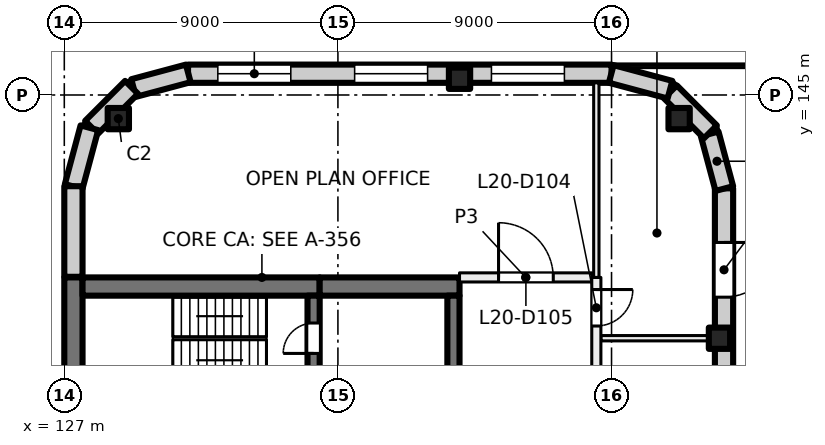
"""IFC4 building model, lengths in metres.
Left out: names, types, materials, properties, quantities, classifications, styles, units other than length and angle.
Written with IfcOpenShell. Run it as: python <this file> out.ifc"""

import sys

from ifc_helpers import new_model, si_unit, direction, frame, frame_2d, origin, origin_2d, place, context, subcontext, project, spatial, rectangle, extrude, element, fill, save


model = new_model("IFC4")
c1 = context("Model", 3, precision=1e-05, world=origin(), true_north=direction((0.0, 1.0)))
c2 = subcontext(c1, "Body", "Model", "MODEL_VIEW")
j1 = project(units=[si_unit("LENGTHUNIT", "METRE"), si_unit("PLANEANGLEUNIT", "RADIAN")], contexts=[c1])
p1 = place(None, origin())
s1 = spatial("IfcSite", under=j1, at=p1, CompositionType="ELEMENT")
p2 = place(p1, origin())
s2 = spatial("IfcBuilding", under=s1, at=p2, CompositionType="ELEMENT")
p3 = place(p2, frame((0.0, 0.0, 89.0)))
s3 = spatial("IfcBuildingStorey", under=s2, at=p3, CompositionType="ELEMENT", Elevation=89.0)
for number, where, z_axis, x_axis in (
    (1, (128.777, 144.223, 0.0), (0.0, 0.0, 1.0), (1.0, 0.0, 0.0)),
    (2, (148.55, 137.0, 0.0), (0.0, 0.0, 1.0), (1.0, 0.0, 0.0)),
    (3, (140.0, 145.55, 0.0), (0.0, 0.0, 1.0), (1.0, 0.0, 0.0)),
    (4, (147.223, 144.223, 0.0), (0.0, 0.0, 1.0), (1.0, 0.0, 0.0)),
):
    element("IfcColumn", number, at=place(p3, frame(where, z_axis=z_axis, x_axis=x_axis)), inside=s3, PredefinedType="COLUMN", context=c2, shape_type="SweptSolid", body=[
        extrude(rectangle(XDim=0.7, YDim=0.7, at=origin_2d()), origin(), (0.0, 0.0, 1.0), 4.0),
    ])
p4 = place(p3, frame((127.3, 135.2, 0.0), z_axis=(0.0, 0.0, 1.0), x_axis=(0.0, 1.0, 0.0)))
e5 = element("IfcWall", 5, at=p4, inside=s3, PredefinedType="SHEAR", context=c2, shape_type="SweptSolid", body=[
    extrude(rectangle(XDim=3.8, YDim=0.6, at=frame_2d((1.9, 0.0))), origin(), (0.0, 0.0, 1.0), 4.0),
])
p5 = place(p3, frame((127.6, 138.7, 0.0), z_axis=(0.0, 0.0, 1.0), x_axis=(1.0, 0.0, 0.0)))
e6 = element("IfcWall", 6, at=p5, inside=s3, PredefinedType="SHEAR", context=c2, shape_type="SweptSolid", body=[
    extrude(rectangle(XDim=7.8, YDim=0.6, at=frame_2d((3.9, 0.0))), origin(), (0.0, 0.0, 1.0), 4.0),
])
p6 = place(p3, frame((135.4, 138.7, 0.0), z_axis=(0.0, 0.0, 1.0), x_axis=(1.0, 0.0, 0.0)))
e7 = element("IfcWall", 7, at=p6, inside=s3, PredefinedType="SHEAR", context=c2, shape_type="SweptSolid", body=[
    extrude(rectangle(XDim=4.6, YDim=0.6, at=frame_2d((2.3, 0.0))), origin(), (0.0, 0.0, 1.0), 4.0),
])
p7 = place(p3, frame((135.2, 135.6, 0.0), z_axis=(0.0, 0.0, 1.0), x_axis=(0.0, 1.0, 0.0)))
e8 = element("IfcWall", 8, at=p7, inside=s3, PredefinedType="SHEAR", context=c2, shape_type="SweptSolid", body=[
    extrude(rectangle(XDim=2.8, YDim=0.4, at=frame_2d((1.4, 0.0))), origin(), (0.0, 0.0, 1.0), 4.0),
])
p8 = place(p7, frame((0.9, 0.0, 0.0)))
e9 = element("IfcOpeningElement", 9, at=p8, cuts=e8, PredefinedType="OPENING", context=c2, shape_type="SweptSolid", body=[
    extrude(rectangle(XDim=1.0, YDim=2.1, at=frame_2d((0.5, 1.05))), frame((0.0, 0.21, 0.0), z_axis=(0.0, -1.0, 0.0), x_axis=(1.0, 0.0, 0.0)), (0.0, 0.0, 1.0), 0.42),
])
p9 = place(p3, frame((139.8, 129.8, 0.0), z_axis=(0.0, 0.0, 1.0), x_axis=(0.0, 1.0, 0.0)))
e10 = element("IfcWall", 10, at=p9, inside=s3, PredefinedType="SHEAR", context=c2, shape_type="SweptSolid", body=[
    extrude(rectangle(XDim=8.6, YDim=0.4, at=frame_2d((4.3, 0.0))), origin(), (0.0, 0.0, 1.0), 4.0),
])
p10 = place(p3, frame((131.07, 145.7, 0.0), z_axis=(0.0, 0.0, 1.0), x_axis=(1.0, 0.0, 0.0)))
e11 = element("IfcWall", 11, at=p10, inside=s3, PredefinedType="SOLIDWALL", context=c2, shape_type="SweptSolid", body=[
    extrude(rectangle(XDim=13.93, YDim=0.6, at=frame_2d((6.965, 0.0))), origin(), (0.0, 0.0, 1.0), 3.625),
])
p11 = place(p10, frame((0.98, 0.0, 0.9)))
e12 = element("IfcOpeningElement", 12, at=p11, cuts=e11, PredefinedType="OPENING", context=c2, shape_type="SweptSolid", body=[
    extrude(rectangle(XDim=2.4, YDim=2.4, at=frame_2d((1.2, 1.2))), frame((0.0, 0.31, 0.0), z_axis=(0.0, -1.0, 0.0), x_axis=(1.0, 0.0, 0.0)), (0.0, 0.0, 1.0), 0.62),
])
p12 = place(p10, frame((5.48, 0.0, 0.9)))
e13 = element("IfcOpeningElement", 13, at=p12, cuts=e11, PredefinedType="OPENING", context=c2, shape_type="SweptSolid", body=[
    extrude(rectangle(XDim=2.4, YDim=2.4, at=frame_2d((1.2, 1.2))), frame((0.0, 0.31, 0.0), z_axis=(0.0, -1.0, 0.0), x_axis=(1.0, 0.0, 0.0)), (0.0, 0.0, 1.0), 0.62),
])
p13 = place(p10, frame((9.98, 0.0, 0.9)))
e14 = element("IfcOpeningElement", 14, at=p13, cuts=e11, PredefinedType="OPENING", context=c2, shape_type="SweptSolid", body=[
    extrude(rectangle(XDim=2.4, YDim=2.4, at=frame_2d((1.2, 1.2))), frame((0.0, 0.31, 0.0), z_axis=(0.0, -1.0, 0.0), x_axis=(1.0, 0.0, 0.0)), (0.0, 0.0, 1.0), 0.62),
])
for number, where, z_axis, x_axis in (
    (15, (129.281, 145.229, 0.0), (0.0, 0.0, 1.0), (0.966, 0.259, 0.0)),
    (16, (127.896, 143.936, 0.0), (0.0, 0.0, 1.0), (0.707, 0.707, 0.0)),
):
    element("IfcWall", number, at=place(p3, frame(where, z_axis=z_axis, x_axis=x_axis)), inside=s3, PredefinedType="SOLIDWALL", context=c2, shape_type="SweptSolid", body=[
        extrude(rectangle(XDim=1.861, YDim=0.6, at=frame_2d((0.93, 0.0))), origin(), (0.0, 0.0, 1.0), 3.625),
    ])
p14 = place(p3, frame((127.308, 141.99, 0.0), z_axis=(0.0, 0.0, 1.0), x_axis=(0.258839784042, 0.965920269068, 0.0)))
e17 = element("IfcWall", 17, at=p14, inside=s3, PredefinedType="SOLIDWALL", context=c2, shape_type="SweptSolid", body=[
    extrude(rectangle(XDim=2.0, YDim=0.6, at=frame_2d((1.0, 0.0))), origin(), (0.0, 0.0, 1.0), 3.625),
])
p15 = place(p3, frame((127.3, 139.02, 0.0), z_axis=(0.0, 0.0, 1.0), x_axis=(0.0, 1.0, 0.0)))
e18 = element("IfcWall", 18, at=p15, inside=s3, PredefinedType="SOLIDWALL", context=c2, shape_type="SweptSolid", body=[
    extrude(rectangle(XDim=2.98, YDim=0.6, at=frame_2d((1.49, 0.0))), origin(), (0.0, 0.0, 1.0), 3.625),
])
p16 = place(p3, frame((148.7, 141.93, 0.0), z_axis=(0.0, 0.0, 1.0), x_axis=(0.0, -1.0, 0.0)))
e19 = element("IfcWall", 19, at=p16, inside=s3, PredefinedType="SOLIDWALL", context=c2, shape_type="SweptSolid", body=[
    extrude(rectangle(XDim=27.93, YDim=0.6, at=frame_2d((13.965, 0.0))), origin(), (0.0, 0.0, 1.0), 3.625),
])
p17 = place(p16, frame((1.78, 0.0, 0.0)))
e20 = element("IfcOpeningElement", 20, at=p17, cuts=e19, PredefinedType="OPENING", context=c2, shape_type="SweptSolid", body=[
    extrude(rectangle(XDim=1.8, YDim=2.4, at=frame_2d((0.9, 1.2))), frame((0.0, 0.31, 0.0), z_axis=(0.0, -1.0, 0.0), x_axis=(1.0, 0.0, 0.0)), (0.0, 0.0, 1.0), 0.62),
])
p18 = place(p16, frame((5.98, 0.0, 0.9)))
e21 = element("IfcOpeningElement", 21, at=p18, cuts=e19, PredefinedType="OPENING", context=c2, shape_type="SweptSolid", body=[
    extrude(rectangle(XDim=2.4, YDim=2.4, at=frame_2d((1.2, 1.2))), frame((0.0, 0.31, 0.0), z_axis=(0.0, -1.0, 0.0), x_axis=(1.0, 0.0, 0.0)), (0.0, 0.0, 1.0), 0.62),
])
p19 = place(p16, frame((10.48, 0.0, 0.9)))
e22 = element("IfcOpeningElement", 22, at=p19, cuts=e19, PredefinedType="OPENING", context=c2, shape_type="SweptSolid", body=[
    extrude(rectangle(XDim=2.4, YDim=2.4, at=frame_2d((1.2, 1.2))), frame((0.0, 0.31, 0.0), z_axis=(0.0, -1.0, 0.0), x_axis=(1.0, 0.0, 0.0)), (0.0, 0.0, 1.0), 0.62),
])
p20 = place(p16, frame((14.98, 0.0, 0.9)))
e23 = element("IfcOpeningElement", 23, at=p20, cuts=e19, PredefinedType="OPENING", context=c2, shape_type="SweptSolid", body=[
    extrude(rectangle(XDim=2.4, YDim=2.4, at=frame_2d((1.2, 1.2))), frame((0.0, 0.31, 0.0), z_axis=(0.0, -1.0, 0.0), x_axis=(1.0, 0.0, 0.0)), (0.0, 0.0, 1.0), 0.62),
])
p21 = place(p16, frame((19.78, 0.0, 0.0)))
e24 = element("IfcOpeningElement", 24, at=p21, cuts=e19, PredefinedType="OPENING", context=c2, shape_type="SweptSolid", body=[
    extrude(rectangle(XDim=1.8, YDim=2.4, at=frame_2d((0.9, 1.2))), frame((0.0, 0.31, 0.0), z_axis=(0.0, -1.0, 0.0), x_axis=(1.0, 0.0, 0.0)), (0.0, 0.0, 1.0), 0.62),
])
p22 = place(p16, frame((23.98, 0.0, 0.9)))
e25 = element("IfcOpeningElement", 25, at=p22, cuts=e19, PredefinedType="OPENING", context=c2, shape_type="SweptSolid", body=[
    extrude(rectangle(XDim=2.4, YDim=2.4, at=frame_2d((1.2, 1.2))), frame((0.0, 0.31, 0.0), z_axis=(0.0, -1.0, 0.0), x_axis=(1.0, 0.0, 0.0)), (0.0, 0.0, 1.0), 0.62),
])
for number, where, z_axis, x_axis in (
    (26, (148.229, 143.719, 0.0), (0.0, 0.0, 1.0), (0.259, -0.966, 0.0)),
    (27, (146.936, 145.104, 0.0), (0.0, 0.0, 1.0), (0.707, -0.707, 0.0)),
):
    element("IfcWall", number, at=place(p3, frame(where, z_axis=z_axis, x_axis=x_axis)), inside=s3, PredefinedType="SOLIDWALL", context=c2, shape_type="SweptSolid", body=[
        extrude(rectangle(XDim=1.861, YDim=0.6, at=frame_2d((0.93, 0.0))), origin(), (0.0, 0.0, 1.0), 3.625),
    ])
p23 = place(p3, frame((144.99, 145.692, 0.0), z_axis=(0.0, 0.0, 1.0), x_axis=(0.965920269068, -0.258839784042, 0.0)))
e28 = element("IfcWall", 28, at=p23, inside=s3, PredefinedType="SOLIDWALL", context=c2, shape_type="SweptSolid", body=[
    extrude(rectangle(XDim=2.0, YDim=0.6, at=frame_2d((1.0, 0.0))), origin(), (0.0, 0.0, 1.0), 3.625),
])
p24 = place(p3, frame((140.0, 139.0, 0.0), z_axis=(0.0, 0.0, 1.0), x_axis=(1.0, 0.0, 0.0)))
e29 = element("IfcWall", 29, at=p24, inside=s3, PredefinedType="PARTITIONING", context=c2, shape_type="SweptSolid", body=[
    extrude(rectangle(XDim=4.35, YDim=0.3, at=frame_2d((2.175, 0.0))), origin(), (0.0, 0.0, 1.0), 3.625),
])
p25 = place(p24, frame((1.283, 0.0, 0.0)))
e30 = element("IfcOpeningElement", 30, at=p25, cuts=e29, PredefinedType="OPENING", context=c2, shape_type="SweptSolid", body=[
    extrude(rectangle(XDim=1.8, YDim=2.1, at=frame_2d((0.9, 1.05))), frame((0.0, 0.16, 0.0), z_axis=(0.0, -1.0, 0.0), x_axis=(1.0, 0.0, 0.0)), (0.0, 0.0, 1.0), 0.32),
])
p26 = place(p3, frame((144.65, 137.0, 0.0), z_axis=(0.0, 0.0, 1.0), x_axis=(1.0, 0.0, 0.0)))
e31 = element("IfcWall", 31, at=p26, inside=s3, PredefinedType="PARTITIONING", context=c2, shape_type="SweptSolid", body=[
    extrude(rectangle(XDim=3.75, YDim=0.175, at=frame_2d((1.875, 0.0))), origin(), (0.0, 0.0, 1.0), 3.625),
])
p27 = place(p3, frame((144.5, 139.0, 0.0), z_axis=(0.0, 0.0, 1.0), x_axis=(0.0, -1.0, 0.0)))
e32 = element("IfcWall", 32, at=p27, inside=s3, PredefinedType="PARTITIONING", context=c2, shape_type="SweptSolid", body=[
    extrude(rectangle(XDim=22.0, YDim=0.3, at=frame_2d((11.0, 0.0))), origin(), (0.0, 0.0, 1.0), 3.625),
])
p28 = place(p27, frame((20.501, 0.0, 0.0)))
e33 = element("IfcOpeningElement", 33, at=p28, cuts=e32, PredefinedType="OPENING", context=c2, shape_type="SweptSolid", body=[
    extrude(rectangle(XDim=1.0, YDim=2.1, at=frame_2d((0.5, 1.05))), frame((0.0, 0.16, 0.0), z_axis=(0.0, -1.0, 0.0), x_axis=(1.0, 0.0, 0.0)), (0.0, 0.0, 1.0), 0.32),
])
p29 = place(p27, frame((15.0, 0.0, 0.0)))
e34 = element("IfcOpeningElement", 34, at=p29, cuts=e32, PredefinedType="OPENING", context=c2, shape_type="SweptSolid", body=[
    extrude(rectangle(XDim=1.0, YDim=2.1, at=frame_2d((0.5, 1.05))), frame((0.0, 0.16, 0.0), z_axis=(0.0, -1.0, 0.0), x_axis=(1.0, 0.0, 0.0)), (0.0, 0.0, 1.0), 0.32),
])
p30 = place(p27, frame((6.0, 0.0, 0.0)))
e35 = element("IfcOpeningElement", 35, at=p30, cuts=e32, PredefinedType="OPENING", context=c2, shape_type="SweptSolid", body=[
    extrude(rectangle(XDim=1.0, YDim=2.1, at=frame_2d((0.5, 1.05))), frame((0.0, 0.16, 0.0), z_axis=(0.0, -1.0, 0.0), x_axis=(1.0, 0.0, 0.0)), (0.0, 0.0, 1.0), 0.32),
])
p31 = place(p27, frame((0.398, 0.0, 0.0)))
e36 = element("IfcOpeningElement", 36, at=p31, cuts=e32, PredefinedType="OPENING", context=c2, shape_type="SweptSolid", body=[
    extrude(rectangle(XDim=1.2, YDim=2.1, at=frame_2d((0.6, 1.05))), frame((0.0, 0.16, 0.0), z_axis=(0.0, -1.0, 0.0), x_axis=(1.0, 0.0, 0.0)), (0.0, 0.0, 1.0), 0.32),
])
p32 = place(p3, frame((144.5, 145.4, 0.0), z_axis=(0.0, 0.0, 1.0), x_axis=(0.0, -1.0, 0.0)))
e37 = element("IfcWall", 37, at=p32, inside=s3, PredefinedType="PARTITIONING", context=c2, shape_type="SweptSolid", body=[
    extrude(rectangle(XDim=6.4, YDim=0.175, at=frame_2d((3.2, 0.0))), origin(), (0.0, 0.0, 1.0), 3.625),
])
p33 = place(p11, origin())
e38 = element("IfcWindow", 38, at=p33, inside=s3, PartitioningType="SINGLE_PANEL", PredefinedType="WINDOW", context=c2, shape_type="SweptSolid", body=[
    extrude(rectangle(XDim=2.4, YDim=2.4, at=frame_2d((1.2, 1.2))), frame((0.0, 0.03, 0.0), z_axis=(0.0, -1.0, 0.0), x_axis=(1.0, 0.0, 0.0)), (0.0, 0.0, 1.0), 0.06),
])
fill(e12, e38)
p34 = place(p12, origin())
e39 = element("IfcWindow", 39, at=p34, inside=s3, PartitioningType="SINGLE_PANEL", PredefinedType="WINDOW", context=c2, shape_type="SweptSolid", body=[
    extrude(rectangle(XDim=2.4, YDim=2.4, at=frame_2d((1.2, 1.2))), frame((0.0, 0.03, 0.0), z_axis=(0.0, -1.0, 0.0), x_axis=(1.0, 0.0, 0.0)), (0.0, 0.0, 1.0), 0.06),
])
fill(e13, e39)
p35 = place(p13, origin())
e40 = element("IfcWindow", 40, at=p35, inside=s3, PartitioningType="SINGLE_PANEL", PredefinedType="WINDOW", context=c2, shape_type="SweptSolid", body=[
    extrude(rectangle(XDim=2.4, YDim=2.4, at=frame_2d((1.2, 1.2))), frame((0.0, 0.03, 0.0), z_axis=(0.0, -1.0, 0.0), x_axis=(1.0, 0.0, 0.0)), (0.0, 0.0, 1.0), 0.06),
])
fill(e14, e40)
p36 = place(p17, origin())
e41 = element("IfcDoor", 41, at=p36, inside=s3, OperationType="DOUBLE_DOOR_SINGLE_SWING", PredefinedType="DOOR", context=c2, shape_type="SweptSolid", body=[
    extrude(rectangle(XDim=1.8, YDim=2.4, at=frame_2d((0.9, 1.2))), frame((0.0, 0.025, 0.0), z_axis=(0.0, -1.0, 0.0), x_axis=(1.0, 0.0, 0.0)), (0.0, 0.0, 1.0), 0.05),
])
fill(e20, e41)
p37 = place(p8, origin())
e42 = element("IfcDoor", 42, at=p37, inside=s3, OperationType="SINGLE_SWING_LEFT", PredefinedType="DOOR", context=c2, shape_type="SweptSolid", body=[
    extrude(rectangle(XDim=1.0, YDim=2.1, at=frame_2d((0.5, 1.05))), frame((0.0, 0.025, 0.0), z_axis=(0.0, -1.0, 0.0), x_axis=(1.0, 0.0, 0.0)), (0.0, 0.0, 1.0), 0.05),
])
fill(e9, e42)
p38 = place(p31, origin())
e43 = element("IfcDoor", 43, at=p38, inside=s3, OperationType="DOUBLE_DOOR_SINGLE_SWING", PredefinedType="DOOR", context=c2, shape_type="SweptSolid", body=[
    extrude(rectangle(XDim=1.2, YDim=2.1, at=frame_2d((0.6, 1.05))), frame((0.0, 0.025, 0.0), z_axis=(0.0, -1.0, 0.0), x_axis=(1.0, 0.0, 0.0)), (0.0, 0.0, 1.0), 0.05),
])
fill(e36, e43)
p39 = place(p25, origin())
e44 = element("IfcDoor", 44, at=p39, inside=s3, OperationType="DOUBLE_DOOR_SINGLE_SWING", PredefinedType="DOOR", context=c2, shape_type="SweptSolid", body=[
    extrude(rectangle(XDim=1.8, YDim=2.1, at=frame_2d((0.9, 1.05))), frame((0.0, 0.025, 0.0), z_axis=(0.0, -1.0, 0.0), x_axis=(1.0, 0.0, 0.0)), (0.0, 0.0, 1.0), 0.05),
])
fill(e30, e44)
save(model, sys.argv[1])
